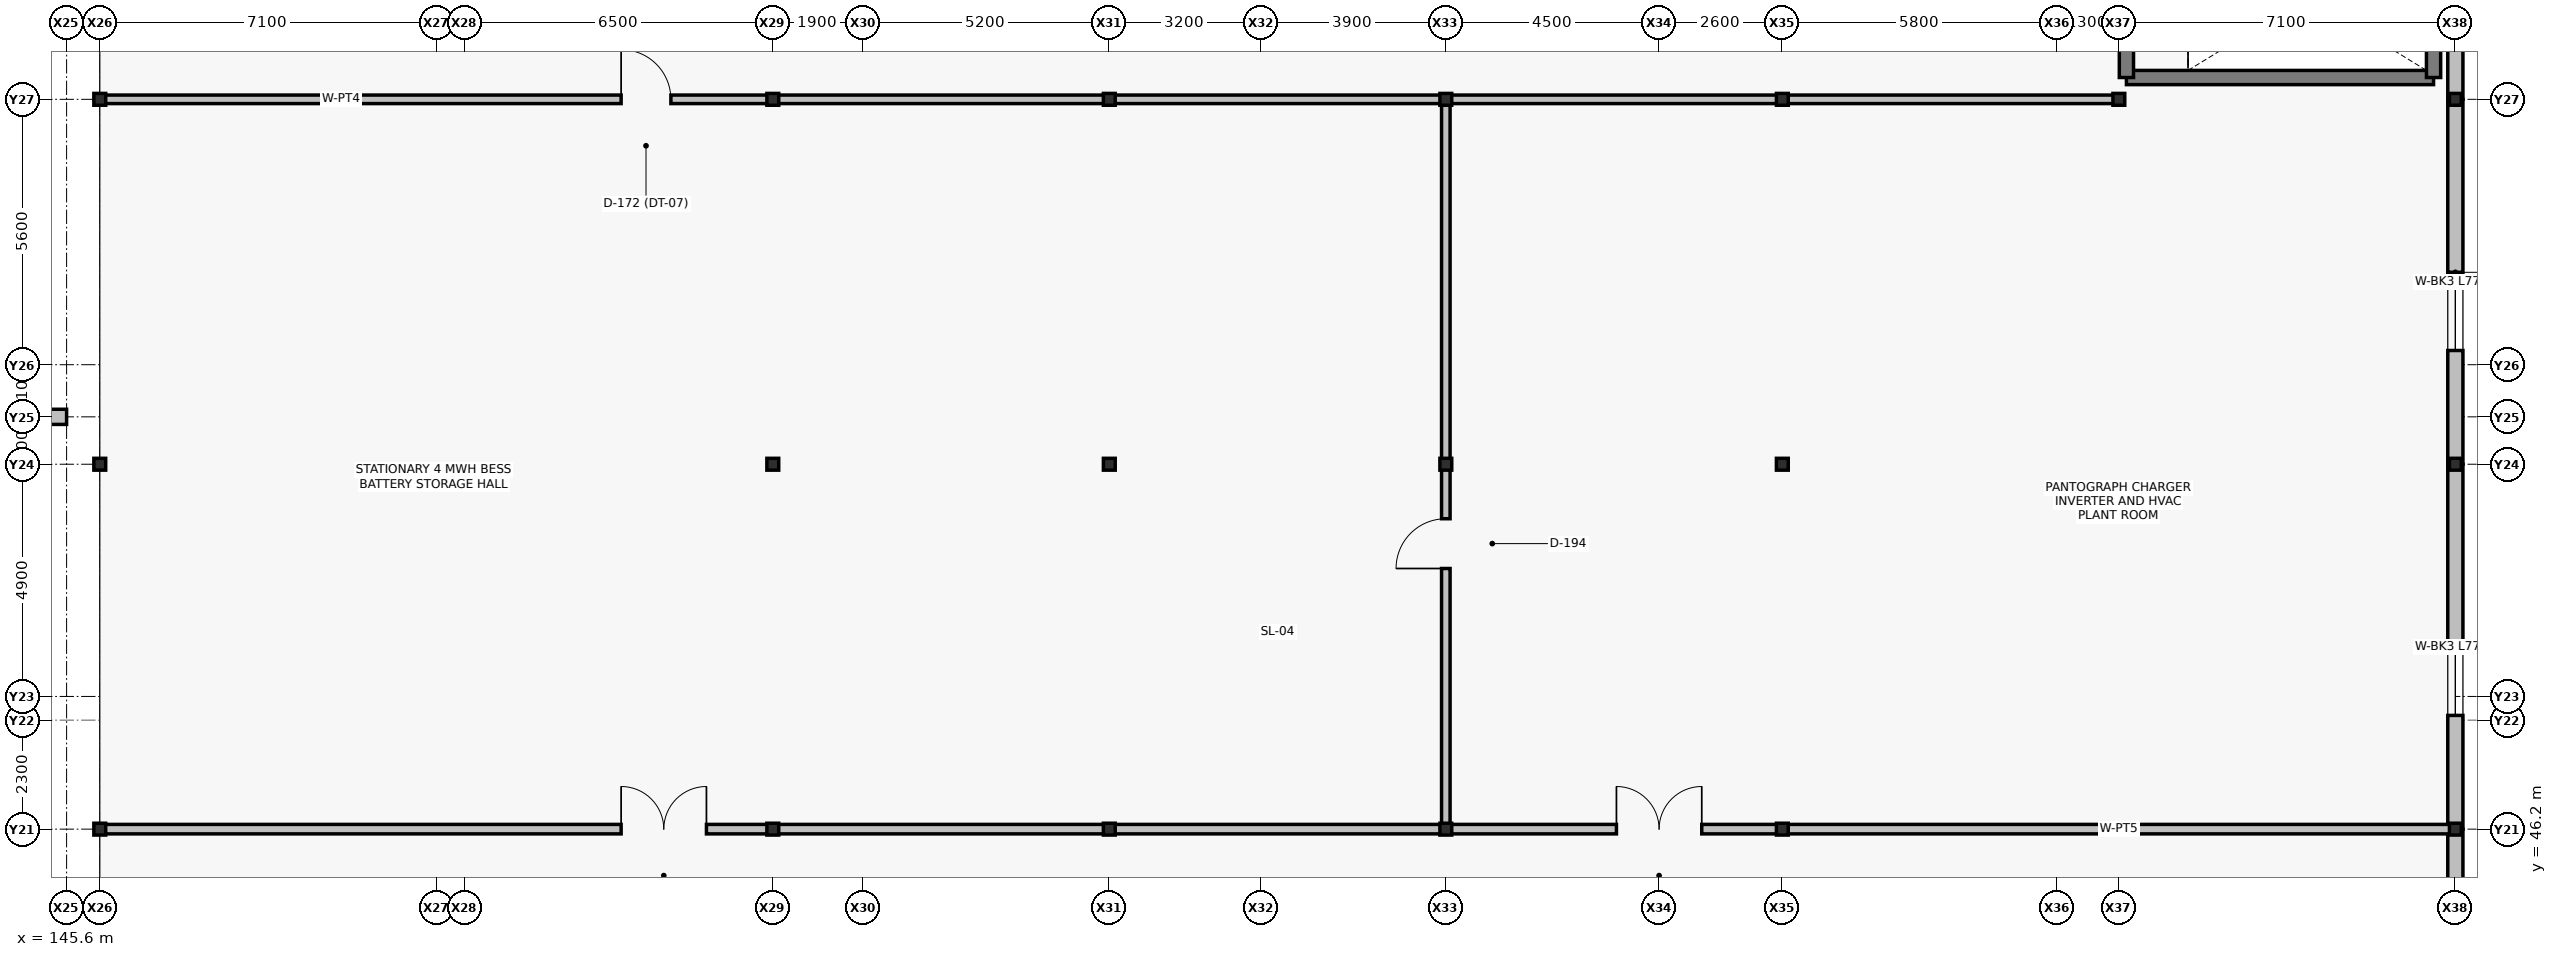
"""IFC4 building model, lengths in metres.
Left out: names, types, materials, properties, quantities, classifications, styles, units other than length and angle.
Written with IfcOpenShell. Run it as: python <this file> out.ifc"""

import sys

from ifc_helpers import new_model, si_unit, direction, frame, frame_2d, origin, origin_2d, place, context, subcontext, project, spatial, rectangle, i_section, extrude, element, fill, save


model = new_model("IFC4")
c1 = context("Model", 3, precision=1e-05, world=origin(), true_north=direction((0.0, 1.0)))
c2 = subcontext(c1, "Body", "Model", "MODEL_VIEW")
j1 = project(units=[si_unit("LENGTHUNIT", "METRE"), si_unit("PLANEANGLEUNIT", "RADIAN")], contexts=[c1])
p1 = place(None, origin())
s1 = spatial("IfcSite", under=j1, at=p1, CompositionType="ELEMENT")
p2 = place(p1, origin())
s2 = spatial("IfcBuilding", under=s1, at=p2, CompositionType="ELEMENT")
p3 = place(p2, frame((0.0, 0.0, 6.0)))
s3 = spatial("IfcBuildingStorey", under=s2, at=p3, CompositionType="ELEMENT", Elevation=6.0)
p4 = place(p3, frame((145.6, 54.9, 0.0), z_axis=(0.0, 0.0, 1.0), x_axis=(1.0, 0.0, 0.0)))
e1 = element("IfcColumn", 1, at=p4, inside=s3, PredefinedType="COLUMN", context=c2, shape_type="SweptSolid", body=[
    extrude(i_section(OverallWidth=0.35, OverallDepth=0.35, WebThickness=0.012, FlangeThickness=0.019, at=origin_2d()), origin(), (0.0, 0.0, 1.0), 9.3),
])
p5 = place(p2, frame((0.0, 0.0, 11.1)))
s4 = spatial("IfcBuildingStorey", under=s2, at=p5, CompositionType="ELEMENT", Elevation=11.1)
for number, where, z_axis, x_axis in (
    (2, (146.3, 46.2, 0.0), (0.0, 0.0, 1.0), (1.0, 0.0, 0.0)),
    (3, (146.3, 53.9, 0.0), (0.0, 0.0, 1.0), (1.0, 0.0, 0.0)),
    (4, (146.3, 61.6, 0.0), (0.0, 0.0, 1.0), (1.0, 0.0, 0.0)),
    (5, (160.5, 46.2, 0.0), (0.0, 0.0, 1.0), (1.0, 0.0, 0.0)),
    (6, (160.5, 53.9, 0.0), (0.0, 0.0, 1.0), (1.0, 0.0, 0.0)),
    (7, (160.5, 61.6, 0.0), (0.0, 0.0, 1.0), (1.0, 0.0, 0.0)),
    (8, (167.6, 46.2, 0.0), (0.0, 0.0, 1.0), (1.0, 0.0, 0.0)),
    (9, (167.6, 53.9, 0.0), (0.0, 0.0, 1.0), (1.0, 0.0, 0.0)),
    (10, (167.6, 61.6, 0.0), (0.0, 0.0, 1.0), (1.0, 0.0, 0.0)),
    (11, (174.7, 46.2, 0.0), (0.0, 0.0, 1.0), (1.0, 0.0, 0.0)),
    (12, (174.7, 53.9, 0.0), (0.0, 0.0, 1.0), (1.0, 0.0, 0.0)),
    (13, (174.7, 61.6, 0.0), (0.0, 0.0, 1.0), (1.0, 0.0, 0.0)),
    (14, (181.8, 46.2, 0.0), (0.0, 0.0, 1.0), (1.0, 0.0, 0.0)),
    (15, (181.8, 53.9, 0.0), (0.0, 0.0, 1.0), (1.0, 0.0, 0.0)),
    (16, (181.8, 61.6, 0.0), (0.0, 0.0, 1.0), (1.0, 0.0, 0.0)),
    (17, (188.9, 61.6, 0.0), (0.0, 0.0, 1.0), (1.0, 0.0, 0.0)),
    (18, (196.0, 46.2, 0.0), (0.0, 0.0, 1.0), (1.0, 0.0, 0.0)),
    (19, (196.0, 53.9, 0.0), (0.0, 0.0, 1.0), (1.0, 0.0, 0.0)),
    (20, (196.0, 61.6, 0.0), (0.0, 0.0, 1.0), (1.0, 0.0, 0.0)),
):
    element("IfcColumn", number, at=place(p5, frame(where, z_axis=z_axis, x_axis=x_axis)), inside=s4, PredefinedType="COLUMN", context=c2, shape_type="SweptSolid", body=[
        extrude(i_section(OverallWidth=0.25, OverallDepth=0.25, WebThickness=0.009, FlangeThickness=0.014, at=origin_2d()), origin(), (0.0, 0.0, 1.0), 4.2),
    ])
p6 = place(p5, frame((137.2, 54.9, -1.9), z_axis=(0.0, 0.0, 1.0), x_axis=(1.0, 0.0, 0.0)))
e21 = element("IfcWall", 21, at=p6, inside=s4, PredefinedType="SOLIDWALL", context=c2, shape_type="SweptSolid", body=[
    extrude(rectangle(XDim=8.4, YDim=0.32, at=frame_2d((4.2, 0.0))), origin(), (0.0, 0.0, 1.0), 5.3),
])
p7 = place(p6, frame((2.8, 0.0, 0.9)))
e22 = element("IfcOpeningElement", 22, at=p7, cuts=e21, PredefinedType="OPENING", context=c2, shape_type="SweptSolid", body=[
    extrude(rectangle(XDim=2.95, YDim=2.15, at=frame_2d((1.475, 1.075))), frame((0.0, 0.17, 0.0), z_axis=(0.0, -1.0, 0.0), x_axis=(1.0, 0.0, 0.0)), (0.0, 0.0, 1.0), 0.34),
])
p8 = place(p5, frame((196.0, 38.5, 0.0), z_axis=(0.0, 0.0, 1.0), x_axis=(0.0, 1.0, 0.0)))
e23 = element("IfcWall", 23, at=p8, inside=s4, PredefinedType="SOLIDWALL", context=c2, shape_type="SweptSolid", body=[
    extrude(rectangle(XDim=7.7, YDim=0.32, at=frame_2d((3.85, 0.0))), origin(), (0.0, 0.0, 1.0), 3.4),
])
p9 = place(p8, frame((2.4, 0.0, 1.0)))
e24 = element("IfcOpeningElement", 24, at=p9, cuts=e23, PredefinedType="OPENING", context=c2, shape_type="SweptSolid", body=[
    extrude(rectangle(XDim=3.4, YDim=2.2, at=frame_2d((1.7, 1.1))), frame((0.0, 0.17, 0.0), z_axis=(0.0, -1.0, 0.0), x_axis=(1.0, 0.0, 0.0)), (0.0, 0.0, 1.0), 0.34),
])
p10 = place(p5, frame((196.0, 46.2, 0.0), z_axis=(0.0, 0.0, 1.0), x_axis=(0.0, 1.0, 0.0)))
e25 = element("IfcWall", 25, at=p10, inside=s4, PredefinedType="SOLIDWALL", context=c2, shape_type="SweptSolid", body=[
    extrude(rectangle(XDim=7.7, YDim=0.32, at=frame_2d((3.85, 0.0))), origin(), (0.0, 0.0, 1.0), 3.4),
])
p11 = place(p10, frame((2.4, 0.0, 1.0)))
e26 = element("IfcOpeningElement", 26, at=p11, cuts=e25, PredefinedType="OPENING", context=c2, shape_type="SweptSolid", body=[
    extrude(rectangle(XDim=1.35, YDim=1.65, at=frame_2d((0.675, 0.825))), frame((0.0, 0.17, 0.0), z_axis=(0.0, -1.0, 0.0), x_axis=(1.0, 0.0, 0.0)), (0.0, 0.0, 1.0), 0.34),
])
p12 = place(p5, frame((196.0, 53.9, 0.0), z_axis=(0.0, 0.0, 1.0), x_axis=(0.0, 1.0, 0.0)))
e27 = element("IfcWall", 27, at=p12, inside=s4, PredefinedType="SOLIDWALL", context=c2, shape_type="SweptSolid", body=[
    extrude(rectangle(XDim=7.7, YDim=0.32, at=frame_2d((3.85, 0.0))), origin(), (0.0, 0.0, 1.0), 3.4),
])
p13 = place(p12, frame((2.4, 0.0, 1.0)))
e28 = element("IfcOpeningElement", 28, at=p13, cuts=e27, PredefinedType="OPENING", context=c2, shape_type="SweptSolid", body=[
    extrude(rectangle(XDim=1.65, YDim=1.95, at=frame_2d((0.825, 0.975))), frame((0.0, 0.17, 0.0), z_axis=(0.0, -1.0, 0.0), x_axis=(1.0, 0.0, 0.0)), (0.0, 0.0, 1.0), 0.34),
])
p14 = place(p5, frame((196.0, 61.6, 0.0), z_axis=(0.0, 0.0, 1.0), x_axis=(0.0, 1.0, 0.0)))
e29 = element("IfcWall", 29, at=p14, inside=s4, PredefinedType="SOLIDWALL", context=c2, shape_type="SweptSolid", body=[
    extrude(rectangle(XDim=7.7, YDim=0.32, at=frame_2d((3.85, 0.0))), origin(), (0.0, 0.0, 1.0), 3.4),
])
p15 = place(p14, frame((2.4, 0.0, 1.0)))
e30 = element("IfcOpeningElement", 30, at=p15, cuts=e29, PredefinedType="OPENING", context=c2, shape_type="SweptSolid", body=[
    extrude(rectangle(XDim=2.25, YDim=1.95, at=frame_2d((1.125, 0.975))), frame((0.0, 0.17, 0.0), z_axis=(0.0, -1.0, 0.0), x_axis=(1.0, 0.0, 0.0)), (0.0, 0.0, 1.0), 0.34),
])
p16 = place(p5, frame((189.06, 62.06, 0.0), z_axis=(0.0, 0.0, 1.0), x_axis=(1.0, 0.0, 0.0)))
e31 = element("IfcWall", 31, at=p16, inside=s4, PredefinedType="SHEAR", context=c2, shape_type="SweptSolid", body=[
    extrude(rectangle(XDim=6.48, YDim=0.3, at=frame_2d((3.24, 0.0))), origin(), (0.0, 0.0, 1.0), 3.92),
])
p17 = place(p5, frame((189.06, 62.06, 0.0), z_axis=(0.0, 0.0, 1.0), x_axis=(0.0, 1.0, 0.0)))
e32 = element("IfcWall", 32, at=p17, inside=s4, PredefinedType="SHEAR", context=c2, shape_type="SweptSolid", body=[
    extrude(rectangle(XDim=6.78, YDim=0.3, at=frame_2d((3.39, 0.0))), origin(), (0.0, 0.0, 1.0), 3.92),
])
p18 = place(p17, frame((3.84, 0.0, 0.0)))
e33 = element("IfcOpeningElement", 33, at=p18, cuts=e32, PredefinedType="OPENING", context=c2, shape_type="SweptSolid", body=[
    extrude(rectangle(XDim=1.5, YDim=2.2, at=frame_2d((0.75, 1.1))), frame((0.0, 0.16, 0.0), z_axis=(0.0, -1.0, 0.0), x_axis=(1.0, 0.0, 0.0)), (0.0, 0.0, 1.0), 0.32),
])
p19 = place(p5, frame((195.54, 62.06, 0.0), z_axis=(0.0, 0.0, 1.0), x_axis=(0.0, 1.0, 0.0)))
e34 = element("IfcWall", 34, at=p19, inside=s4, PredefinedType="SHEAR", context=c2, shape_type="SweptSolid", body=[
    extrude(rectangle(XDim=6.78, YDim=0.3, at=frame_2d((3.39, 0.0))), origin(), (0.0, 0.0, 1.0), 3.92),
])
p20 = place(p5, frame((146.3, 61.6, 0.0), z_axis=(0.0, 0.0, 1.0), x_axis=(1.0, 0.0, 0.0)))
e35 = element("IfcWall", 35, at=p20, inside=s4, PredefinedType="PARTITIONING", context=c2, shape_type="SweptSolid", body=[
    extrude(rectangle(XDim=42.6, YDim=0.18, at=frame_2d((21.3, 0.0))), origin(), (0.0, 0.0, 1.0), 3.3),
])
p21 = place(p20, frame((11.0, 0.0, 0.0)))
e36 = element("IfcOpeningElement", 36, at=p21, cuts=e35, PredefinedType="OPENING", context=c2, shape_type="SweptSolid", body=[
    extrude(rectangle(XDim=1.05, YDim=2.15, at=frame_2d((0.525, 1.075))), frame((0.0, 0.1, 0.0), z_axis=(0.0, -1.0, 0.0), x_axis=(1.0, 0.0, 0.0)), (0.0, 0.0, 1.0), 0.2),
])
p22 = place(p5, frame((146.3, 46.2, 0.0), z_axis=(0.0, 0.0, 1.0), x_axis=(1.0, 0.0, 0.0)))
e37 = element("IfcWall", 37, at=p22, inside=s4, PredefinedType="PARTITIONING", context=c2, shape_type="SweptSolid", body=[
    extrude(rectangle(XDim=49.7, YDim=0.2, at=frame_2d((24.85, 0.0))), origin(), (0.0, 0.0, 1.0), 3.15),
])
p23 = place(p22, frame((11.0, 0.0, 0.0)))
e38 = element("IfcOpeningElement", 38, at=p23, cuts=e37, PredefinedType="OPENING", context=c2, shape_type="SweptSolid", body=[
    extrude(rectangle(XDim=1.8, YDim=2.3, at=frame_2d((0.9, 1.15))), frame((0.0, 0.11, 0.0), z_axis=(0.0, -1.0, 0.0), x_axis=(1.0, 0.0, 0.0)), (0.0, 0.0, 1.0), 0.22),
])
p24 = place(p22, frame((32.0, 0.0, 0.0)))
e39 = element("IfcOpeningElement", 39, at=p24, cuts=e37, PredefinedType="OPENING", context=c2, shape_type="SweptSolid", body=[
    extrude(rectangle(XDim=1.8, YDim=2.3, at=frame_2d((0.9, 1.15))), frame((0.0, 0.11, 0.0), z_axis=(0.0, -1.0, 0.0), x_axis=(1.0, 0.0, 0.0)), (0.0, 0.0, 1.0), 0.22),
])
p25 = place(p5, frame((174.7, 46.2, 0.0), z_axis=(0.0, 0.0, 1.0), x_axis=(0.0, 1.0, 0.0)))
e40 = element("IfcWall", 40, at=p25, inside=s4, PredefinedType="PARTITIONING", context=c2, shape_type="SweptSolid", body=[
    extrude(rectangle(XDim=15.4, YDim=0.18, at=frame_2d((7.7, 0.0))), origin(), (0.0, 0.0, 1.0), 3.15),
])
p26 = place(p25, frame((5.5, 0.0, 0.0)))
e41 = element("IfcOpeningElement", 41, at=p26, cuts=e40, PredefinedType="OPENING", context=c2, shape_type="SweptSolid", body=[
    extrude(rectangle(XDim=1.05, YDim=2.15, at=frame_2d((0.525, 1.075))), frame((0.0, 0.1, 0.0), z_axis=(0.0, -1.0, 0.0), x_axis=(1.0, 0.0, 0.0)), (0.0, 0.0, 1.0), 0.2),
])
p27 = place(p11, origin())
e42 = element("IfcWindow", 42, at=p27, inside=s4, PartitioningType="SINGLE_PANEL", PredefinedType="WINDOW", context=c2, shape_type="SweptSolid", body=[
    extrude(rectangle(XDim=1.35, YDim=1.65, at=frame_2d((0.675, 0.825))), frame((0.0, 0.03, 0.0), z_axis=(0.0, -1.0, 0.0), x_axis=(1.0, 0.0, 0.0)), (0.0, 0.0, 1.0), 0.06),
])
fill(e26, e42)
p28 = place(p13, origin())
e43 = element("IfcWindow", 43, at=p28, inside=s4, PartitioningType="SINGLE_PANEL", PredefinedType="WINDOW", context=c2, shape_type="SweptSolid", body=[
    extrude(rectangle(XDim=1.65, YDim=1.95, at=frame_2d((0.825, 0.975))), frame((0.0, 0.03, 0.0), z_axis=(0.0, -1.0, 0.0), x_axis=(1.0, 0.0, 0.0)), (0.0, 0.0, 1.0), 0.06),
])
fill(e28, e43)
p29 = place(p21, origin())
e44 = element("IfcDoor", 44, at=p29, inside=s4, OperationType="SINGLE_SWING_LEFT", PredefinedType="DOOR", context=c2, shape_type="SweptSolid", body=[
    extrude(rectangle(XDim=1.05, YDim=2.15, at=frame_2d((0.525, 1.075))), frame((0.0, 0.025, 0.0), z_axis=(0.0, -1.0, 0.0), x_axis=(1.0, 0.0, 0.0)), (0.0, 0.0, 1.0), 0.05),
])
fill(e36, e44)
p30 = place(p23, origin())
e45 = element("IfcDoor", 45, at=p30, inside=s4, OperationType="DOUBLE_DOOR_SINGLE_SWING", PredefinedType="DOOR", context=c2, shape_type="SweptSolid", body=[
    extrude(rectangle(XDim=1.8, YDim=2.3, at=frame_2d((0.9, 1.15))), frame((0.0, 0.025, 0.0), z_axis=(0.0, -1.0, 0.0), x_axis=(1.0, 0.0, 0.0)), (0.0, 0.0, 1.0), 0.05),
])
fill(e38, e45)
p31 = place(p24, origin())
e46 = element("IfcDoor", 46, at=p31, inside=s4, OperationType="DOUBLE_DOOR_SINGLE_SWING", PredefinedType="DOOR", context=c2, shape_type="SweptSolid", body=[
    extrude(rectangle(XDim=1.8, YDim=2.3, at=frame_2d((0.9, 1.15))), frame((0.0, 0.025, 0.0), z_axis=(0.0, -1.0, 0.0), x_axis=(1.0, 0.0, 0.0)), (0.0, 0.0, 1.0), 0.05),
])
fill(e39, e46)
p32 = place(p26, origin())
e47 = element("IfcDoor", 47, at=p32, inside=s4, OperationType="SINGLE_SWING_LEFT", PredefinedType="DOOR", context=c2, shape_type="SweptSolid", body=[
    extrude(rectangle(XDim=1.05, YDim=2.15, at=frame_2d((0.525, 1.075))), frame((0.0, 0.025, 0.0), z_axis=(0.0, -1.0, 0.0), x_axis=(1.0, 0.0, 0.0)), (0.0, 0.0, 1.0), 0.05),
])
fill(e41, e47)
save(model, sys.argv[1])
